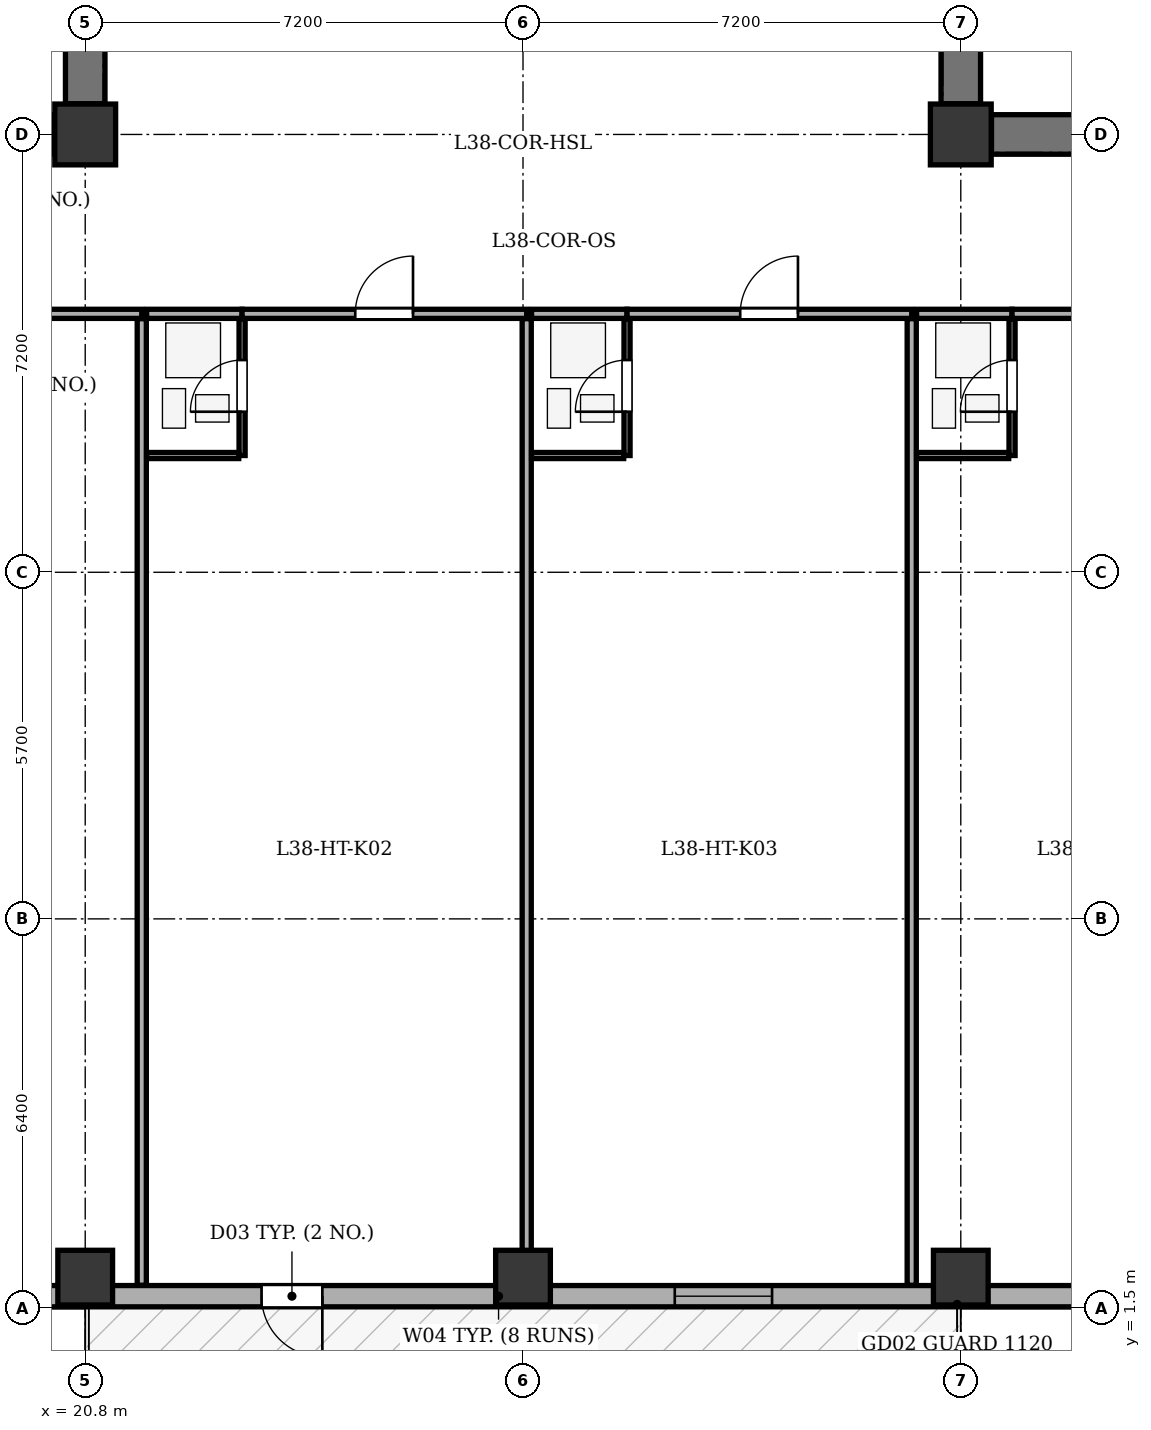
"""IFC4 building model, lengths in metres.
Left out: names, types, materials, properties, quantities, classifications, styles, units other than length and angle.
Written with IfcOpenShell. Run it as: python <this file> out.ifc"""

import sys

from ifc_helpers import new_model, si_unit, direction, frame, frame_2d, origin, origin_2d, place, context, subcontext, project, spatial, rectangle, extrude, element, fill, save


model = new_model("IFC4")
c1 = context("Model", 3, precision=1e-05, world=origin(), true_north=direction((0.0, 1.0)))
c2 = subcontext(c1, "Body", "Model", "MODEL_VIEW")
j1 = project(units=[si_unit("LENGTHUNIT", "METRE"), si_unit("PLANEANGLEUNIT", "RADIAN")], contexts=[c1])
p1 = place(None, origin())
s1 = spatial("IfcSite", under=j1, at=p1, CompositionType="ELEMENT")
p2 = place(p1, origin())
s2 = spatial("IfcBuilding", under=s1, at=p2, CompositionType="ELEMENT")
p3 = place(p2, frame((0.0, 0.0, 151.8)))
s3 = spatial("IfcBuildingStorey", under=s2, at=p3, CompositionType="ELEMENT", Elevation=151.8)
for number, where, z_axis, x_axis in (
    (1, (20.8, 20.8, 0.0), (0.0, 0.0, 1.0), (1.0, 0.0, 0.0)),
    (2, (35.2, 20.8, 0.0), (0.0, 0.0, 1.0), (1.0, 0.0, 0.0)),
):
    element("IfcColumn", number, at=place(p3, frame(where, z_axis=z_axis, x_axis=x_axis)), inside=s3, PredefinedType="COLUMN", context=c2, shape_type="SweptSolid", body=[
        extrude(rectangle(XDim=1.0, YDim=1.0, at=origin_2d()), origin(), (0.0, 0.0, 1.0), 3.5),
    ])
for number, where, z_axis, x_axis in (
    (3, (20.8, 2.0, 0.0), (0.0, 0.0, 1.0), (1.0, 0.0, 0.0)),
    (4, (28.0, 2.0, 0.0), (0.0, 0.0, 1.0), (1.0, 0.0, 0.0)),
    (5, (35.2, 2.0, 0.0), (0.0, 0.0, 1.0), (1.0, 0.0, 0.0)),
):
    element("IfcColumn", number, at=place(p3, frame(where, z_axis=z_axis, x_axis=x_axis)), inside=s3, PredefinedType="COLUMN", context=c2, shape_type="SweptSolid", body=[
        extrude(rectangle(XDim=0.9, YDim=0.9, at=origin_2d()), origin(), (0.0, 0.0, 1.0), 3.5),
    ])
p4 = place(p3, frame((50.7, 1.695, 0.0), z_axis=(0.0, 0.0, 1.0), x_axis=(-1.0, 0.0, 0.0)))
e6 = element("IfcWall", 6, at=p4, inside=s3, PredefinedType="STANDARD", context=c2, shape_type="SweptSolid", body=[
    extrude(rectangle(XDim=35.0, YDim=0.35, at=frame_2d((17.5, 0.0))), origin(), (0.0, 0.0, 1.0), 2.785),
])
p5 = place(p4, frame((26.0, 0.0, 0.0)))
e7 = element("IfcOpeningElement", 7, at=p5, cuts=e6, PredefinedType="OPENING", context=c2, shape_type="SweptSolid", body=[
    extrude(rectangle(XDim=1.0, YDim=2.02, at=frame_2d((0.5, 1.01))), frame((0.0, 0.185, 0.0), z_axis=(0.0, -1.0, 0.0), x_axis=(1.0, 0.0, 0.0)), (0.0, 0.0, 1.0), 0.37),
])
p6 = place(p4, frame((1.763, 0.0, 0.75)))
e8 = element("IfcOpeningElement", 8, at=p6, cuts=e6, PredefinedType="OPENING", context=c2, shape_type="SweptSolid", body=[
    extrude(rectangle(XDim=1.6, YDim=1.75, at=frame_2d((0.8, 0.875))), frame((0.0, 0.185, 0.0), z_axis=(0.0, -1.0, 0.0), x_axis=(1.0, 0.0, 0.0)), (0.0, 0.0, 1.0), 0.37),
])
p7 = place(p4, frame((6.764, 0.0, 0.75)))
e9 = element("IfcOpeningElement", 9, at=p7, cuts=e6, PredefinedType="OPENING", context=c2, shape_type="SweptSolid", body=[
    extrude(rectangle(XDim=1.6, YDim=1.75, at=frame_2d((0.8, 0.875))), frame((0.0, 0.185, 0.0), z_axis=(0.0, -1.0, 0.0), x_axis=(1.0, 0.0, 0.0)), (0.0, 0.0, 1.0), 0.37),
])
p8 = place(p4, frame((11.989, 0.0, 0.75)))
e10 = element("IfcOpeningElement", 10, at=p8, cuts=e6, PredefinedType="OPENING", context=c2, shape_type="SweptSolid", body=[
    extrude(rectangle(XDim=1.6, YDim=1.75, at=frame_2d((0.8, 0.875))), frame((0.0, 0.185, 0.0), z_axis=(0.0, -1.0, 0.0), x_axis=(1.0, 0.0, 0.0)), (0.0, 0.0, 1.0), 0.37),
])
p9 = place(p4, frame((18.604, 0.0, 0.75)))
e11 = element("IfcOpeningElement", 11, at=p9, cuts=e6, PredefinedType="OPENING", context=c2, shape_type="SweptSolid", body=[
    extrude(rectangle(XDim=1.6, YDim=1.75, at=frame_2d((0.8, 0.875))), frame((0.0, 0.185, 0.0), z_axis=(0.0, -1.0, 0.0), x_axis=(1.0, 0.0, 0.0)), (0.0, 0.0, 1.0), 0.37),
])
p10 = place(p4, frame((31.613, 0.0, 0.75)))
e12 = element("IfcOpeningElement", 12, at=p10, cuts=e6, PredefinedType="OPENING", context=c2, shape_type="SweptSolid", body=[
    extrude(rectangle(XDim=1.6, YDim=1.75, at=frame_2d((0.8, 0.875))), frame((0.0, 0.185, 0.0), z_axis=(0.0, -1.0, 0.0), x_axis=(1.0, 0.0, 0.0)), (0.0, 0.0, 1.0), 0.37),
])
p11 = place(p3, frame((13.305, 20.8, 0.0), z_axis=(0.0, 0.0, 1.0), x_axis=(1.0, 0.0, 0.0)))
e13 = element("IfcWall", 13, at=p11, inside=s3, PredefinedType="SHEAR", context=c2, shape_type="SweptSolid", body=[
    extrude(rectangle(XDim=6.99, YDim=0.65, at=frame_2d((3.495, 0.0))), origin(), (0.0, 0.0, 1.0), 3.2),
])
p12 = place(p3, frame((20.8, 21.305, 0.0), z_axis=(0.0, 0.0, 1.0), x_axis=(0.0, 1.0, 0.0)))
e14 = element("IfcWall", 14, at=p12, inside=s3, PredefinedType="SHEAR", context=c2, shape_type="SweptSolid", body=[
    extrude(rectangle(XDim=3.745, YDim=0.65, at=frame_2d((1.873, 0.0))), origin(), (0.0, 0.0, 1.0), 3.2),
])
p13 = place(p12, frame((1.295, 0.0, 0.0)))
e15 = element("IfcOpeningElement", 15, at=p13, cuts=e14, PredefinedType="OPENING", context=c2, shape_type="SweptSolid", body=[
    extrude(rectangle(XDim=1.2, YDim=2.15, at=frame_2d((0.6, 1.075))), frame((0.0, 0.335, 0.0), z_axis=(0.0, -1.0, 0.0), x_axis=(1.0, 0.0, 0.0)), (0.0, 0.0, 1.0), 0.67),
])
p14 = place(p3, frame((35.705, 20.8, 0.0), z_axis=(0.0, 0.0, 1.0), x_axis=(1.0, 0.0, 0.0)))
e16 = element("IfcWall", 16, at=p14, inside=s3, PredefinedType="SHEAR", context=c2, shape_type="SweptSolid", body=[
    extrude(rectangle(XDim=6.99, YDim=0.65, at=frame_2d((3.495, 0.0))), origin(), (0.0, 0.0, 1.0), 3.2),
])
p15 = place(p3, frame((35.2, 21.305, 0.0), z_axis=(0.0, 0.0, 1.0), x_axis=(0.0, 1.0, 0.0)))
e17 = element("IfcWall", 17, at=p15, inside=s3, PredefinedType="SHEAR", context=c2, shape_type="SweptSolid", body=[
    extrude(rectangle(XDim=11.79, YDim=0.65, at=frame_2d((5.895, 0.0))), origin(), (0.0, 0.0, 1.0), 3.2),
])
p16 = place(p15, frame((1.295, 0.0, 0.0)))
e18 = element("IfcOpeningElement", 18, at=p16, cuts=e17, PredefinedType="OPENING", context=c2, shape_type="SweptSolid", body=[
    extrude(rectangle(XDim=1.2, YDim=2.15, at=frame_2d((0.6, 1.075))), frame((0.0, 0.335, 0.0), z_axis=(0.0, -1.0, 0.0), x_axis=(1.0, 0.0, 0.0)), (0.0, 0.0, 1.0), 0.67),
])
p17 = place(p15, frame((4.295, 0.0, 0.0)))
e19 = element("IfcOpeningElement", 19, at=p17, cuts=e17, PredefinedType="OPENING", context=c2, shape_type="SweptSolid", body=[
    extrude(rectangle(XDim=1.1, YDim=2.1, at=frame_2d((0.55, 1.05))), frame((0.0, 0.335, 0.0), z_axis=(0.0, -1.0, 0.0), x_axis=(1.0, 0.0, 0.0)), (0.0, 0.0, 1.0), 0.67),
])
p18 = place(p15, frame((6.245, 0.0, 0.0)))
e20 = element("IfcOpeningElement", 20, at=p18, cuts=e17, PredefinedType="OPENING", context=c2, shape_type="SweptSolid", body=[
    extrude(rectangle(XDim=1.1, YDim=2.1, at=frame_2d((0.55, 1.05))), frame((0.0, 0.335, 0.0), z_axis=(0.0, -1.0, 0.0), x_axis=(1.0, 0.0, 0.0)), (0.0, 0.0, 1.0), 0.67),
])
p19 = place(p15, frame((8.195, 0.0, 0.0)))
e21 = element("IfcOpeningElement", 21, at=p19, cuts=e17, PredefinedType="OPENING", context=c2, shape_type="SweptSolid", body=[
    extrude(rectangle(XDim=1.1, YDim=2.1, at=frame_2d((0.55, 1.05))), frame((0.0, 0.335, 0.0), z_axis=(0.0, -1.0, 0.0), x_axis=(1.0, 0.0, 0.0)), (0.0, 0.0, 1.0), 0.67),
])
p20 = place(p3, frame((17.35, 17.85, 0.0), z_axis=(0.0, 0.0, 1.0), x_axis=(1.0, 0.0, 0.0)))
e22 = element("IfcWall", 22, at=p20, inside=s3, PredefinedType="PARTITIONING", context=c2, shape_type="SweptSolid", body=[
    extrude(rectangle(XDim=4.38, YDim=0.15, at=frame_2d((2.19, 0.0))), origin(), (0.0, 0.0, 1.0), 3.2),
])
p21 = place(p20, frame((1.71, 0.0, 0.0)))
e23 = element("IfcOpeningElement", 23, at=p21, cuts=e22, PredefinedType="OPENING", context=c2, shape_type="SweptSolid", body=[
    extrude(rectangle(XDim=0.95, YDim=2.1, at=frame_2d((0.475, 1.05))), frame((0.0, 0.085, 0.0), z_axis=(0.0, -1.0, 0.0), x_axis=(1.0, 0.0, 0.0)), (0.0, 0.0, 1.0), 0.17),
])
p22 = place(p3, frame((21.73, 1.875, 0.0), z_axis=(0.0, 0.0, 1.0), x_axis=(0.0, 1.0, 0.0)))
e24 = element("IfcWall", 24, at=p22, inside=s3, PredefinedType="PARTITIONING", context=c2, shape_type="SweptSolid", body=[
    extrude(rectangle(XDim=15.895, YDim=0.15, at=frame_2d((7.948, 0.0))), origin(), (0.0, 0.0, 1.0), 3.2),
])
p23 = place(p3, frame((21.81, 17.85, 0.0), z_axis=(0.0, 0.0, 1.0), x_axis=(1.0, 0.0, 0.0)))
e25 = element("IfcWall", 25, at=p23, inside=s3, PredefinedType="PARTITIONING", context=c2, shape_type="SweptSolid", body=[
    extrude(rectangle(XDim=1.57, YDim=0.15, at=frame_2d((0.785, 0.0))), origin(), (0.0, 0.0, 1.0), 3.2),
])
p24 = place(p3, frame((23.38, 17.85, 0.0), z_axis=(0.0, 0.0, 1.0), x_axis=(1.0, 0.0, 0.0)))
e26 = element("IfcWall", 26, at=p24, inside=s3, PredefinedType="PARTITIONING", context=c2, shape_type="SweptSolid", body=[
    extrude(rectangle(XDim=4.681, YDim=0.15, at=frame_2d((2.341, 0.0))), origin(), (0.0, 0.0, 1.0), 3.2),
])
p25 = place(p24, frame((1.861, 0.0, 0.0)))
e27 = element("IfcOpeningElement", 27, at=p25, cuts=e26, PredefinedType="OPENING", context=c2, shape_type="SweptSolid", body=[
    extrude(rectangle(XDim=0.95, YDim=2.1, at=frame_2d((0.475, 1.05))), frame((0.0, 0.085, 0.0), z_axis=(0.0, -1.0, 0.0), x_axis=(1.0, 0.0, 0.0)), (0.0, 0.0, 1.0), 0.17),
])
p26 = place(p3, frame((23.38, 15.52, 0.0), z_axis=(0.0, 0.0, 1.0), x_axis=(0.0, 1.0, 0.0)))
e28 = element("IfcWall", 28, at=p26, inside=s3, PredefinedType="PARTITIONING", context=c2, shape_type="SweptSolid", body=[
    extrude(rectangle(XDim=2.25, YDim=0.1, at=frame_2d((1.125, 0.0))), origin(), (0.0, 0.0, 1.0), 3.2),
])
p27 = place(p26, frame((0.72, 0.0, 0.0)))
e29 = element("IfcOpeningElement", 29, at=p27, cuts=e28, PredefinedType="OPENING", context=c2, shape_type="SweptSolid", body=[
    extrude(rectangle(XDim=0.85, YDim=2.05, at=frame_2d((0.425, 1.025))), frame((0.0, 0.06, 0.0), z_axis=(0.0, -1.0, 0.0), x_axis=(1.0, 0.0, 0.0)), (0.0, 0.0, 1.0), 0.12),
])
p28 = place(p3, frame((21.81, 15.52, 0.0), z_axis=(0.0, 0.0, 1.0), x_axis=(1.0, 0.0, 0.0)))
e30 = element("IfcWall", 30, at=p28, inside=s3, PredefinedType="PARTITIONING", context=c2, shape_type="SweptSolid", body=[
    extrude(rectangle(XDim=1.515, YDim=0.1, at=frame_2d((0.757, 0.0))), origin(), (0.0, 0.0, 1.0), 3.2),
])
p29 = place(p3, frame((28.061, 1.875, 0.0), z_axis=(0.0, 0.0, 1.0), x_axis=(0.0, 1.0, 0.0)))
e31 = element("IfcWall", 31, at=p29, inside=s3, PredefinedType="PARTITIONING", context=c2, shape_type="SweptSolid", body=[
    extrude(rectangle(XDim=15.895, YDim=0.15, at=frame_2d((7.948, 0.0))), origin(), (0.0, 0.0, 1.0), 2.535),
])
p30 = place(p3, frame((28.141, 17.85, 0.0), z_axis=(0.0, 0.0, 1.0), x_axis=(1.0, 0.0, 0.0)))
e32 = element("IfcWall", 32, at=p30, inside=s3, PredefinedType="PARTITIONING", context=c2, shape_type="SweptSolid", body=[
    extrude(rectangle(XDim=1.57, YDim=0.15, at=frame_2d((0.785, 0.0))), origin(), (0.0, 0.0, 1.0), 3.2),
])
p31 = place(p3, frame((29.711, 17.85, 0.0), z_axis=(0.0, 0.0, 1.0), x_axis=(1.0, 0.0, 0.0)))
e33 = element("IfcWall", 33, at=p31, inside=s3, PredefinedType="PARTITIONING", context=c2, shape_type="SweptSolid", body=[
    extrude(rectangle(XDim=4.682, YDim=0.15, at=frame_2d((2.341, 0.0))), origin(), (0.0, 0.0, 1.0), 3.2),
])
p32 = place(p31, frame((1.861, 0.0, 0.0)))
e34 = element("IfcOpeningElement", 34, at=p32, cuts=e33, PredefinedType="OPENING", context=c2, shape_type="SweptSolid", body=[
    extrude(rectangle(XDim=0.95, YDim=2.1, at=frame_2d((0.475, 1.05))), frame((0.0, 0.085, 0.0), z_axis=(0.0, -1.0, 0.0), x_axis=(1.0, 0.0, 0.0)), (0.0, 0.0, 1.0), 0.17),
])
p33 = place(p3, frame((29.711, 15.52, 0.0), z_axis=(0.0, 0.0, 1.0), x_axis=(0.0, 1.0, 0.0)))
e35 = element("IfcWall", 35, at=p33, inside=s3, PredefinedType="PARTITIONING", context=c2, shape_type="SweptSolid", body=[
    extrude(rectangle(XDim=2.25, YDim=0.1, at=frame_2d((1.125, 0.0))), origin(), (0.0, 0.0, 1.0), 2.785),
])
p34 = place(p33, frame((0.72, 0.0, 0.0)))
e36 = element("IfcOpeningElement", 36, at=p34, cuts=e35, PredefinedType="OPENING", context=c2, shape_type="SweptSolid", body=[
    extrude(rectangle(XDim=0.85, YDim=2.05, at=frame_2d((0.425, 1.025))), frame((0.0, 0.06, 0.0), z_axis=(0.0, -1.0, 0.0), x_axis=(1.0, 0.0, 0.0)), (0.0, 0.0, 1.0), 0.12),
])
p35 = place(p3, frame((28.141, 15.52, 0.0), z_axis=(0.0, 0.0, 1.0), x_axis=(1.0, 0.0, 0.0)))
e37 = element("IfcWall", 37, at=p35, inside=s3, PredefinedType="PARTITIONING", context=c2, shape_type="SweptSolid", body=[
    extrude(rectangle(XDim=1.515, YDim=0.1, at=frame_2d((0.757, 0.0))), origin(), (0.0, 0.0, 1.0), 3.2),
])
p36 = place(p3, frame((34.393, 1.875, 0.0), z_axis=(0.0, 0.0, 1.0), x_axis=(0.0, 1.0, 0.0)))
e38 = element("IfcWall", 38, at=p36, inside=s3, PredefinedType="PARTITIONING", context=c2, shape_type="SweptSolid", body=[
    extrude(rectangle(XDim=15.895, YDim=0.15, at=frame_2d((7.948, 0.0))), origin(), (0.0, 0.0, 1.0), 3.2),
])
p37 = place(p3, frame((34.473, 17.85, 0.0), z_axis=(0.0, 0.0, 1.0), x_axis=(1.0, 0.0, 0.0)))
e39 = element("IfcWall", 39, at=p37, inside=s3, PredefinedType="PARTITIONING", context=c2, shape_type="SweptSolid", body=[
    extrude(rectangle(XDim=1.57, YDim=0.15, at=frame_2d((0.785, 0.0))), origin(), (0.0, 0.0, 1.0), 3.2),
])
p38 = place(p3, frame((36.043, 17.85, 0.0), z_axis=(0.0, 0.0, 1.0), x_axis=(1.0, 0.0, 0.0)))
e40 = element("IfcWall", 40, at=p38, inside=s3, PredefinedType="PARTITIONING", context=c2, shape_type="SweptSolid", body=[
    extrude(rectangle(XDim=4.38, YDim=0.15, at=frame_2d((2.19, 0.0))), origin(), (0.0, 0.0, 1.0), 3.2),
])
p39 = place(p38, frame((1.71, 0.0, 0.0)))
e41 = element("IfcOpeningElement", 41, at=p39, cuts=e40, PredefinedType="OPENING", context=c2, shape_type="SweptSolid", body=[
    extrude(rectangle(XDim=0.95, YDim=2.1, at=frame_2d((0.475, 1.05))), frame((0.0, 0.085, 0.0), z_axis=(0.0, -1.0, 0.0), x_axis=(1.0, 0.0, 0.0)), (0.0, 0.0, 1.0), 0.17),
])
p40 = place(p3, frame((36.043, 15.52, 0.0), z_axis=(0.0, 0.0, 1.0), x_axis=(0.0, 1.0, 0.0)))
e42 = element("IfcWall", 42, at=p40, inside=s3, PredefinedType="PARTITIONING", context=c2, shape_type="SweptSolid", body=[
    extrude(rectangle(XDim=2.25, YDim=0.1, at=frame_2d((1.125, 0.0))), origin(), (0.0, 0.0, 1.0), 3.2),
])
p41 = place(p40, frame((0.72, 0.0, 0.0)))
e43 = element("IfcOpeningElement", 43, at=p41, cuts=e42, PredefinedType="OPENING", context=c2, shape_type="SweptSolid", body=[
    extrude(rectangle(XDim=0.85, YDim=2.05, at=frame_2d((0.425, 1.025))), frame((0.0, 0.06, 0.0), z_axis=(0.0, -1.0, 0.0), x_axis=(1.0, 0.0, 0.0)), (0.0, 0.0, 1.0), 0.12),
])
p42 = place(p3, frame((34.473, 15.52, 0.0), z_axis=(0.0, 0.0, 1.0), x_axis=(1.0, 0.0, 0.0)))
e44 = element("IfcWall", 44, at=p42, inside=s3, PredefinedType="PARTITIONING", context=c2, shape_type="SweptSolid", body=[
    extrude(rectangle(XDim=1.515, YDim=0.1, at=frame_2d((0.758, 0.0))), origin(), (0.0, 0.0, 1.0), 3.2),
])
p43 = place(p5, origin())
e45 = element("IfcDoor", 45, at=p43, inside=s3, OperationType="SINGLE_SWING_LEFT", PredefinedType="DOOR", context=c2, shape_type="SweptSolid", body=[
    extrude(rectangle(XDim=1.0, YDim=2.02, at=frame_2d((0.5, 1.01))), frame((0.0, 0.025, 0.0), z_axis=(0.0, -1.0, 0.0), x_axis=(1.0, 0.0, 0.0)), (0.0, 0.0, 1.0), 0.05),
])
fill(e7, e45)
p44 = place(p9, origin())
e46 = element("IfcWindow", 46, at=p44, inside=s3, PartitioningType="SINGLE_PANEL", PredefinedType="WINDOW", context=c2, shape_type="SweptSolid", body=[
    extrude(rectangle(XDim=1.6, YDim=1.75, at=frame_2d((0.8, 0.875))), frame((0.0, -0.01, 0.0), z_axis=(0.0, -1.0, 0.0), x_axis=(1.0, 0.0, 0.0)), (0.0, 0.0, 1.0), 0.06),
])
fill(e11, e46)
p45 = place(p27, origin())
e47 = element("IfcDoor", 47, at=p45, inside=s3, OperationType="SINGLE_SWING_LEFT", PredefinedType="DOOR", context=c2, shape_type="SweptSolid", body=[
    extrude(rectangle(XDim=0.85, YDim=2.05, at=frame_2d((0.425, 1.025))), frame((0.0, 0.025, 0.0), z_axis=(0.0, -1.0, 0.0), x_axis=(1.0, 0.0, 0.0)), (0.0, 0.0, 1.0), 0.05),
])
fill(e29, e47)
p46 = place(p25, origin())
e48 = element("IfcDoor", 48, at=p46, inside=s3, OperationType="SINGLE_SWING_RIGHT", PredefinedType="DOOR", context=c2, shape_type="SweptSolid", body=[
    extrude(rectangle(XDim=0.95, YDim=2.1, at=frame_2d((0.475, 1.05))), frame((0.0, 0.025, 0.0), z_axis=(0.0, -1.0, 0.0), x_axis=(1.0, 0.0, 0.0)), (0.0, 0.0, 1.0), 0.05),
])
fill(e27, e48)
p47 = place(p34, origin())
e49 = element("IfcDoor", 49, at=p47, inside=s3, OperationType="SINGLE_SWING_LEFT", PredefinedType="DOOR", context=c2, shape_type="SweptSolid", body=[
    extrude(rectangle(XDim=0.85, YDim=2.05, at=frame_2d((0.425, 1.025))), frame((0.0, 0.025, 0.0), z_axis=(0.0, -1.0, 0.0), x_axis=(1.0, 0.0, 0.0)), (0.0, 0.0, 1.0), 0.05),
])
fill(e36, e49)
p48 = place(p32, origin())
e50 = element("IfcDoor", 50, at=p48, inside=s3, OperationType="SINGLE_SWING_RIGHT", PredefinedType="DOOR", context=c2, shape_type="SweptSolid", body=[
    extrude(rectangle(XDim=0.95, YDim=2.1, at=frame_2d((0.475, 1.05))), frame((0.0, 0.025, 0.0), z_axis=(0.0, -1.0, 0.0), x_axis=(1.0, 0.0, 0.0)), (0.0, 0.0, 1.0), 0.05),
])
fill(e34, e50)
p49 = place(p41, origin())
e51 = element("IfcDoor", 51, at=p49, inside=s3, OperationType="SINGLE_SWING_LEFT", PredefinedType="DOOR", context=c2, shape_type="SweptSolid", body=[
    extrude(rectangle(XDim=0.85, YDim=2.05, at=frame_2d((0.425, 1.025))), frame((0.0, 0.025, 0.0), z_axis=(0.0, -1.0, 0.0), x_axis=(1.0, 0.0, 0.0)), (0.0, 0.0, 1.0), 0.05),
])
fill(e43, e51)
save(model, sys.argv[1])
